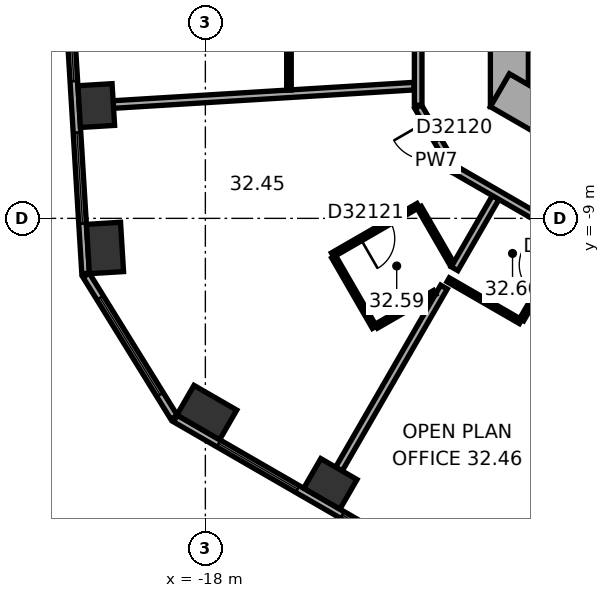
"""IFC4 building model, lengths in metres.
Left out: names, types, materials, properties, quantities, classifications, styles, units other than length and angle.
Written with IfcOpenShell. Run it as: python <this file> out.ifc"""

import sys

from ifc_helpers import new_model, si_unit, direction, frame, frame_2d, origin, origin_2d, place, context, subcontext, project, spatial, rectangle, extrude, element, fill, save


model = new_model("IFC4")
c1 = context("Model", 3, precision=1e-05, world=origin(), true_north=direction((0.0, 1.0)))
c2 = subcontext(c1, "Body", "Model", "MODEL_VIEW")
j1 = project(units=[si_unit("LENGTHUNIT", "METRE"), si_unit("PLANEANGLEUNIT", "RADIAN")], contexts=[c1])
p1 = place(None, origin())
s1 = spatial("IfcSite", under=j1, at=p1, CompositionType="ELEMENT")
p2 = place(p1, origin())
s2 = spatial("IfcBuilding", under=s1, at=p2, CompositionType="ELEMENT")
p3 = place(p2, frame((0.0, 0.0, 131.8)))
s3 = spatial("IfcBuildingStorey", under=s2, at=p3, CompositionType="ELEMENT", Elevation=131.8)
p4 = place(p3, frame((-20.871, -6.032, 0.0), z_axis=(0.0, 0.0, 1.0), x_axis=(0.061048539535, -0.998134798422, 0.0)))
e1 = element("IfcColumn", 1, at=p4, inside=s3, PredefinedType="COLUMN", context=c2, shape_type="SweptSolid", body=[
    extrude(rectangle(XDim=1.1, YDim=0.9, at=origin_2d()), origin(), (0.0, 0.0, 1.0), 3.7),
])
for number, where, z_axis, x_axis in (
    (2, (-20.642, -9.779, 0.0), (0.0, 0.0, 1.0), (0.061, -0.998, 0.0)),
    (3, (-17.962, -14.109, 0.0), (0.0, 0.0, 1.0), (0.866, -0.5, 0.0)),
):
    element("IfcColumn", number, at=place(p3, frame(where, z_axis=z_axis, x_axis=x_axis)), inside=s3, PredefinedType="COLUMN", context=c2, shape_type="SweptSolid", body=[
        extrude(rectangle(XDim=1.3, YDim=0.9, at=origin_2d()), origin(), (0.0, 0.0, 1.0), 3.7),
    ])
p5 = place(p3, frame((-14.711, -15.986, 0.0), z_axis=(0.0, 0.0, 1.0), x_axis=(0.866025403784, -0.5, 0.0)))
e4 = element("IfcColumn", 4, at=p5, inside=s3, PredefinedType="COLUMN", context=c2, shape_type="SweptSolid", body=[
    extrude(rectangle(XDim=1.1, YDim=0.9, at=origin_2d()), origin(), (0.0, 0.0, 1.0), 3.7),
])
p6 = place(p3, frame((-10.0, 6.062, 0.0), z_axis=(0.0, 0.0, 1.0), x_axis=(0.0, -1.0, 0.0)))
e5 = element("IfcWall", 5, at=p6, inside=s3, PredefinedType="SHEAR", context=c2, shape_type="SweptSolid", body=[
    extrude(rectangle(XDim=12.125, YDim=1.0, at=frame_2d((6.062, 0.0))), origin(), (0.0, 0.0, 1.0), 3.7),
])
p7 = place(p6, frame((6.612, 0.0, 0.0)))
e6 = element("IfcOpeningElement", 6, at=p7, cuts=e5, PredefinedType="OPENING", context=c2, shape_type="SweptSolid", body=[
    extrude(rectangle(XDim=0.9, YDim=2.1, at=frame_2d((0.45, 1.05))), frame((0.0, 0.51, 0.0), z_axis=(0.0, -1.0, 0.0), x_axis=(1.0, 0.0, 0.0)), (0.0, 0.0, 1.0), 1.02),
])
p8 = place(p3, frame((-10.25, -5.629, 0.0), z_axis=(0.0, 0.0, 1.0), x_axis=(0.866022616891, -0.50000482701, 0.0)))
e7 = element("IfcWall", 7, at=p8, inside=s3, PredefinedType="SHEAR", context=c2, shape_type="SweptSolid", body=[
    extrude(rectangle(XDim=12.125, YDim=1.0, at=frame_2d((6.062, 0.0))), origin(), (0.0, 0.0, 1.0), 3.7),
])
p9 = place(p8, frame((6.262, 0.0, 0.0)))
e8 = element("IfcOpeningElement", 8, at=p9, cuts=e7, PredefinedType="OPENING", context=c2, shape_type="SweptSolid", body=[
    extrude(rectangle(XDim=1.5, YDim=2.1, at=frame_2d((0.75, 1.05))), frame((0.0, 0.51, 0.0), z_axis=(0.0, -1.0, 0.0), x_axis=(1.0, 0.0, 0.0)), (0.0, 0.0, 1.0), 1.02),
])
p10 = place(p8, frame((1.812, 0.0, 0.0)))
e9 = element("IfcOpeningElement", 9, at=p10, cuts=e7, PredefinedType="OPENING", context=c2, shape_type="SweptSolid", body=[
    extrude(rectangle(XDim=0.9, YDim=2.1, at=frame_2d((0.45, 1.05))), frame((0.0, 0.51, 0.0), z_axis=(0.0, -1.0, 0.0), x_axis=(1.0, 0.0, 0.0)), (0.0, 0.0, 1.0), 1.02),
])
p11 = place(p8, frame((4.412, 0.0, 0.0)))
e10 = element("IfcOpeningElement", 10, at=p11, cuts=e7, PredefinedType="OPENING", context=c2, shape_type="SweptSolid", body=[
    extrude(rectangle(XDim=0.9, YDim=2.1, at=frame_2d((0.45, 1.05))), frame((0.0, 0.51, 0.0), z_axis=(0.0, -1.0, 0.0), x_axis=(1.0, 0.0, 0.0)), (0.0, 0.0, 1.0), 1.02),
])
p12 = place(p3, frame((-22.375, 9.557, 0.0), z_axis=(0.0, 0.0, 1.0), x_axis=(0.061036015339, -0.998135564356, 0.0)))
e11 = element("IfcWall", 11, at=p12, inside=s3, PredefinedType="STANDARD", context=c2, shape_type="SweptSolid", body=[
    extrude(rectangle(XDim=20.044, YDim=0.2, at=frame_2d((10.022, 0.0))), origin(), (0.0, 0.0, 1.0), 3.7),
])
p13 = place(p12, frame((1.313, 0.0, 0.9)))
e12 = element("IfcOpeningElement", 12, at=p13, cuts=e11, PredefinedType="OPENING", context=c2, shape_type="SweptSolid", body=[
    extrude(rectangle(XDim=2.4, YDim=2.0, at=frame_2d((1.2, 1.0))), frame((0.0, 0.11, 0.0), z_axis=(0.0, -1.0, 0.0), x_axis=(1.0, 0.0, 0.0)), (0.0, 0.0, 1.0), 0.22),
])
p14 = place(p12, frame((5.067, 0.0, 0.9)))
e13 = element("IfcOpeningElement", 13, at=p14, cuts=e11, PredefinedType="OPENING", context=c2, shape_type="SweptSolid", body=[
    extrude(rectangle(XDim=2.4, YDim=2.0, at=frame_2d((1.2, 1.0))), frame((0.0, 0.11, 0.0), z_axis=(0.0, -1.0, 0.0), x_axis=(1.0, 0.0, 0.0)), (0.0, 0.0, 1.0), 0.22),
])
p15 = place(p12, frame((8.821, 0.0, 0.9)))
e14 = element("IfcOpeningElement", 14, at=p15, cuts=e11, PredefinedType="OPENING", context=c2, shape_type="SweptSolid", body=[
    extrude(rectangle(XDim=2.4, YDim=2.0, at=frame_2d((1.2, 1.0))), frame((0.0, 0.11, 0.0), z_axis=(0.0, -1.0, 0.0), x_axis=(1.0, 0.0, 0.0)), (0.0, 0.0, 1.0), 0.22),
])
p16 = place(p12, frame((12.575, 0.0, 0.9)))
e15 = element("IfcOpeningElement", 15, at=p16, cuts=e11, PredefinedType="OPENING", context=c2, shape_type="SweptSolid", body=[
    extrude(rectangle(XDim=2.4, YDim=2.0, at=frame_2d((1.2, 1.0))), frame((0.0, 0.11, 0.0), z_axis=(0.0, -1.0, 0.0), x_axis=(1.0, 0.0, 0.0)), (0.0, 0.0, 1.0), 0.22),
])
p17 = place(p12, frame((16.329, 0.0, 0.9)))
e16 = element("IfcOpeningElement", 16, at=p17, cuts=e11, PredefinedType="OPENING", context=c2, shape_type="SweptSolid", body=[
    extrude(rectangle(XDim=2.4, YDim=2.0, at=frame_2d((1.2, 1.0))), frame((0.0, 0.11, 0.0), z_axis=(0.0, -1.0, 0.0), x_axis=(1.0, 0.0, 0.0)), (0.0, 0.0, 1.0), 0.22),
])
p18 = place(p3, frame((-21.137, -10.496, 0.0), z_axis=(0.0, 0.0, 1.0), x_axis=(0.526178661629, -0.850374044786, 0.0)))
e17 = element("IfcWall", 17, at=p18, inside=s3, PredefinedType="STANDARD", context=c2, shape_type="SweptSolid", body=[
    extrude(rectangle(XDim=4.395, YDim=0.2, at=frame_2d((2.197, 0.0))), origin(), (0.0, 0.0, 1.0), 3.7),
])
p19 = place(p18, frame((0.698, 0.0, 0.9)))
e18 = element("IfcOpeningElement", 18, at=p19, cuts=e17, PredefinedType="OPENING", context=c2, shape_type="SweptSolid", body=[
    extrude(rectangle(XDim=3.0, YDim=2.0, at=frame_2d((1.5, 1.0))), frame((0.0, 0.11, 0.0), z_axis=(0.0, -1.0, 0.0), x_axis=(1.0, 0.0, 0.0)), (0.0, 0.0, 1.0), 0.22),
])
p20 = place(p3, frame((-18.789, -14.267, 0.0), z_axis=(0.0, 0.0, 1.0), x_axis=(0.866023315909, -0.500003616288, 0.0)))
e19 = element("IfcWall", 19, at=p20, inside=s3, PredefinedType="STANDARD", context=c2, shape_type="SweptSolid", body=[
    extrude(rectangle(XDim=20.044, YDim=0.2, at=frame_2d((10.022, 0.0))), origin(), (0.0, 0.0, 1.0), 3.7),
])
p21 = place(p20, frame((1.314, 0.0, 0.9)))
e20 = element("IfcOpeningElement", 20, at=p21, cuts=e19, PredefinedType="OPENING", context=c2, shape_type="SweptSolid", body=[
    extrude(rectangle(XDim=2.4, YDim=2.0, at=frame_2d((1.2, 1.0))), frame((0.0, 0.11, 0.0), z_axis=(0.0, -1.0, 0.0), x_axis=(1.0, 0.0, 0.0)), (0.0, 0.0, 1.0), 0.22),
])
p22 = place(p20, frame((5.069, 0.0, 0.9)))
e21 = element("IfcOpeningElement", 21, at=p22, cuts=e19, PredefinedType="OPENING", context=c2, shape_type="SweptSolid", body=[
    extrude(rectangle(XDim=2.4, YDim=2.0, at=frame_2d((1.2, 1.0))), frame((0.0, 0.11, 0.0), z_axis=(0.0, -1.0, 0.0), x_axis=(1.0, 0.0, 0.0)), (0.0, 0.0, 1.0), 0.22),
])
p23 = place(p20, frame((8.823, 0.0, 0.9)))
e22 = element("IfcOpeningElement", 22, at=p23, cuts=e19, PredefinedType="OPENING", context=c2, shape_type="SweptSolid", body=[
    extrude(rectangle(XDim=2.4, YDim=2.0, at=frame_2d((1.2, 1.0))), frame((0.0, 0.11, 0.0), z_axis=(0.0, -1.0, 0.0), x_axis=(1.0, 0.0, 0.0)), (0.0, 0.0, 1.0), 0.22),
])
p24 = place(p20, frame((12.577, 0.0, 0.9)))
e23 = element("IfcOpeningElement", 23, at=p24, cuts=e19, PredefinedType="OPENING", context=c2, shape_type="SweptSolid", body=[
    extrude(rectangle(XDim=2.4, YDim=2.0, at=frame_2d((1.2, 1.0))), frame((0.0, 0.11, 0.0), z_axis=(0.0, -1.0, 0.0), x_axis=(1.0, 0.0, 0.0)), (0.0, 0.0, 1.0), 0.22),
])
p25 = place(p20, frame((16.331, 0.0, 0.9)))
e24 = element("IfcOpeningElement", 24, at=p25, cuts=e19, PredefinedType="OPENING", context=c2, shape_type="SweptSolid", body=[
    extrude(rectangle(XDim=2.4, YDim=2.0, at=frame_2d((1.2, 1.0))), frame((0.0, 0.11, 0.0), z_axis=(0.0, -1.0, 0.0), x_axis=(1.0, 0.0, 0.0)), (0.0, 0.0, 1.0), 0.22),
])
p26 = place(p3, frame((-20.421, -6.005, 0.0), z_axis=(0.0, 0.0, 1.0), x_axis=(0.998134865741, 0.061047438866, 0.0)))
e25 = element("IfcWall", 25, at=p26, inside=s3, PredefinedType="PARTITIONING", context=c2, shape_type="SweptSolid", body=[
    extrude(rectangle(XDim=7.927, YDim=0.2, at=frame_2d((3.963, 0.0))), origin(), (0.0, 0.0, 1.0), 2.87),
])
p27 = place(p3, frame((-15.8, -5.622, 0.0), z_axis=(0.0, 0.0, 1.0), x_axis=(0.0, 1.0, 0.0)))
e26 = element("IfcWall", 26, at=p27, inside=s3, PredefinedType="PARTITIONING", context=c2, shape_type="SweptSolid", body=[
    extrude(rectangle(XDim=3.308, YDim=0.12, at=frame_2d((1.654, 0.0))), origin(), (0.0, 0.0, 1.0), 3.42),
])
p28 = place(p3, frame((-14.653, -9.961, 0.0), z_axis=(0.0, 0.0, 1.0), x_axis=(0.866021400173, 0.500006934395, 0.0)))
e27 = element("IfcWall", 27, at=p28, inside=s3, PredefinedType="PARTITIONING", context=c2, shape_type="SweptSolid", body=[
    extrude(rectangle(XDim=2.6, YDim=0.12, at=frame_2d((1.3, 0.0))), origin(), (0.0, 0.0, 1.0), 3.42),
])
p29 = place(p28, frame((0.85, 0.0, 0.0)))
e28 = element("IfcOpeningElement", 28, at=p29, cuts=e27, PredefinedType="OPENING", context=c2, shape_type="SweptSolid", body=[
    extrude(rectangle(XDim=0.9, YDim=2.1, at=frame_2d((0.45, 1.05))), frame((0.0, 0.07, 0.0), z_axis=(0.0, -1.0, 0.0), x_axis=(1.0, 0.0, 0.0)), (0.0, 0.0, 1.0), 0.14),
])
p30 = place(p3, frame((-14.486, -15.597, 0.0), z_axis=(0.0, 0.0, 1.0), x_axis=(0.500003965547, 0.866023114263, 0.0)))
e29 = element("IfcWall", 29, at=p30, inside=s3, PredefinedType="PARTITIONING", context=c2, shape_type="SweptSolid", body=[
    extrude(rectangle(XDim=5.53, YDim=0.2, at=frame_2d((2.765, 0.0))), origin(), (0.0, 0.0, 1.0), 3.42),
])
p31 = place(p3, frame((-13.552, -11.866, 0.0), z_axis=(0.0, 0.0, 1.0), x_axis=(-0.500028586798, 0.86600889856, 0.0)))
e30 = element("IfcWall", 30, at=p31, inside=s3, PredefinedType="PARTITIONING", context=c2, shape_type="SweptSolid", body=[
    extrude(rectangle(XDim=2.14, YDim=0.12, at=frame_2d((1.07, 0.0))), origin(), (0.0, 0.0, 1.0), 3.42),
])
p32 = place(p3, frame((-12.4, -6.062, 0.0), z_axis=(0.0, 0.0, 1.0), x_axis=(0.500022797313, -0.86601224135, 0.0)))
e31 = element("IfcWall", 31, at=p32, inside=s3, PredefinedType="PARTITIONING", context=c2, shape_type="SweptSolid", body=[
    extrude(rectangle(XDim=1.9, YDim=0.2, at=frame_2d((0.95, 0.0))), origin(), (0.0, 0.0, 1.0), 3.42),
])
p33 = place(p32, frame((0.45, 0.0, 0.0)))
e32 = element("IfcOpeningElement", 32, at=p33, cuts=e31, PredefinedType="OPENING", context=c2, shape_type="SweptSolid", body=[
    extrude(rectangle(XDim=1.0, YDim=2.1, at=frame_2d((0.5, 1.05))), frame((0.0, 0.11, 0.0), z_axis=(0.0, -1.0, 0.0), x_axis=(1.0, 0.0, 0.0)), (0.0, 0.0, 1.0), 0.22),
])
p34 = place(p3, frame((-12.4, 5.769, 0.0), z_axis=(0.0, 0.0, 1.0), x_axis=(0.0, -1.0, 0.0)))
e33 = element("IfcWall", 33, at=p34, inside=s3, PredefinedType="PARTITIONING", context=c2, shape_type="SweptSolid", body=[
    extrude(rectangle(XDim=11.792, YDim=0.2, at=frame_2d((5.896, 0.0))), origin(), (0.0, 0.0, 1.0), 3.42),
])
p35 = place(p34, frame((1.381, 0.0, 0.0)))
e34 = element("IfcOpeningElement", 34, at=p35, cuts=e33, PredefinedType="OPENING", context=c2, shape_type="SweptSolid", body=[
    extrude(rectangle(XDim=1.0, YDim=2.1, at=frame_2d((0.5, 1.05))), frame((0.0, 0.11, 0.0), z_axis=(0.0, -1.0, 0.0), x_axis=(1.0, 0.0, 0.0)), (0.0, 0.0, 1.0), 0.22),
])
p36 = place(p34, frame((5.397, 0.0, 0.0)))
e35 = element("IfcOpeningElement", 35, at=p36, cuts=e33, PredefinedType="OPENING", context=c2, shape_type="SweptSolid", body=[
    extrude(rectangle(XDim=1.0, YDim=2.1, at=frame_2d((0.5, 1.05))), frame((0.0, 0.11, 0.0), z_axis=(0.0, -1.0, 0.0), x_axis=(1.0, 0.0, 0.0)), (0.0, 0.0, 1.0), 0.22),
])
p37 = place(p3, frame((-12.371, -8.713, 0.0), z_axis=(0.0, 0.0, 1.0), x_axis=(0.499910907645, -0.86607683517, 0.0)))
e36 = element("IfcWall", 36, at=p37, inside=s3, PredefinedType="PARTITIONING", context=c2, shape_type="SweptSolid", body=[
    extrude(rectangle(XDim=1.719, YDim=0.12, at=frame_2d((0.86, 0.0))), origin(), (0.0, 0.0, 1.0), 3.42),
])
p38 = place(p3, frame((-11.964, -10.949, 0.0), z_axis=(0.0, 0.0, 1.0), x_axis=(-0.86600680221, -0.500032217487, 0.0)))
e37 = element("IfcWall", 37, at=p38, inside=s3, PredefinedType="PARTITIONING", context=c2, shape_type="SweptSolid", body=[
    extrude(rectangle(XDim=1.774, YDim=0.12, at=frame_2d((0.887, 0.0))), origin(), (0.0, 0.0, 1.0), 3.42),
])
p39 = place(p3, frame((-11.442, -10.325, 0.0), z_axis=(0.0, 0.0, 1.0), x_axis=(0.500012369163, 0.866018262327, 0.0)))
e38 = element("IfcWall", 38, at=p39, inside=s3, PredefinedType="PARTITIONING", context=c2, shape_type="SweptSolid", body=[
    extrude(rectangle(XDim=2.163, YDim=0.2, at=frame_2d((1.081, 0.0))), origin(), (0.0, 0.0, 1.0), 3.42),
])
p40 = place(p3, frame((-11.415, -7.728, 0.0), z_axis=(0.0, 0.0, 1.0), x_axis=(0.866022749921, -0.500004596598, 0.0)))
e39 = element("IfcWall", 39, at=p40, inside=s3, PredefinedType="PARTITIONING", context=c2, shape_type="SweptSolid", body=[
    extrude(rectangle(XDim=12.084, YDim=0.2, at=frame_2d((6.042, 0.0))), origin(), (0.0, 0.0, 1.0), 3.42),
])
p41 = place(p40, frame((5.58, 0.0, 0.0)))
e40 = element("IfcOpeningElement", 40, at=p41, cuts=e39, PredefinedType="OPENING", context=c2, shape_type="SweptSolid", body=[
    extrude(rectangle(XDim=1.0, YDim=2.1, at=frame_2d((0.5, 1.05))), frame((0.0, 0.11, 0.0), z_axis=(0.0, -1.0, 0.0), x_axis=(1.0, 0.0, 0.0)), (0.0, 0.0, 1.0), 0.22),
])
p42 = place(p3, frame((-9.706, -11.717, 0.0), z_axis=(0.0, 0.0, 1.0), x_axis=(-0.86598042715, 0.500077893725, 0.0)))
e41 = element("IfcWall", 41, at=p42, inside=s3, PredefinedType="PARTITIONING", context=c2, shape_type="SweptSolid", body=[
    extrude(rectangle(XDim=2.2, YDim=0.12, at=frame_2d((1.1, 0.0))), origin(), (0.0, 0.0, 1.0), 3.42),
])
p43 = place(p3, frame((-8.456, -9.552, 0.0), z_axis=(0.0, 0.0, 1.0), x_axis=(-0.500002508028, -0.866023955769, 0.0)))
e42 = element("IfcWall", 42, at=p43, inside=s3, PredefinedType="PARTITIONING", context=c2, shape_type="SweptSolid", body=[
    extrude(rectangle(XDim=2.44, YDim=0.12, at=frame_2d((1.22, 0.0))), origin(), (0.0, 0.0, 1.0), 3.42),
])
p44 = place(p43, frame((0.77, 0.0, 0.0)))
e43 = element("IfcOpeningElement", 43, at=p44, cuts=e42, PredefinedType="OPENING", context=c2, shape_type="SweptSolid", body=[
    extrude(rectangle(XDim=0.9, YDim=2.1, at=frame_2d((0.45, 1.05))), frame((0.0, 0.07, 0.0), z_axis=(0.0, -1.0, 0.0), x_axis=(1.0, 0.0, 0.0)), (0.0, 0.0, 1.0), 0.14),
])
p45 = place(p16, origin())
e44 = element("IfcWindow", 44, at=p45, inside=s3, PartitioningType="SINGLE_PANEL", PredefinedType="WINDOW", context=c2, shape_type="SweptSolid", body=[
    extrude(rectangle(XDim=2.4, YDim=2.0, at=frame_2d((1.2, 1.0))), frame((0.0, 0.03, 0.0), z_axis=(0.0, -1.0, 0.0), x_axis=(1.0, 0.0, 0.0)), (0.0, 0.0, 1.0), 0.06),
])
fill(e15, e44)
p46 = place(p17, origin())
e45 = element("IfcWindow", 45, at=p46, inside=s3, PartitioningType="SINGLE_PANEL", PredefinedType="WINDOW", context=c2, shape_type="SweptSolid", body=[
    extrude(rectangle(XDim=2.4, YDim=2.0, at=frame_2d((1.2, 1.0))), frame((0.0, 0.03, 0.0), z_axis=(0.0, -1.0, 0.0), x_axis=(1.0, 0.0, 0.0)), (0.0, 0.0, 1.0), 0.06),
])
fill(e16, e45)
p47 = place(p19, origin())
e46 = element("IfcWindow", 46, at=p47, inside=s3, PartitioningType="SINGLE_PANEL", PredefinedType="WINDOW", context=c2, shape_type="SweptSolid", body=[
    extrude(rectangle(XDim=3.0, YDim=2.0, at=frame_2d((1.5, 1.0))), frame((0.0, 0.03, 0.0), z_axis=(0.0, -1.0, 0.0), x_axis=(1.0, 0.0, 0.0)), (0.0, 0.0, 1.0), 0.06),
])
fill(e18, e46)
p48 = place(p21, origin())
e47 = element("IfcWindow", 47, at=p48, inside=s3, PartitioningType="SINGLE_PANEL", PredefinedType="WINDOW", context=c2, shape_type="SweptSolid", body=[
    extrude(rectangle(XDim=2.4, YDim=2.0, at=frame_2d((1.2, 1.0))), frame((0.0, 0.03, 0.0), z_axis=(0.0, -1.0, 0.0), x_axis=(1.0, 0.0, 0.0)), (0.0, 0.0, 1.0), 0.06),
])
fill(e20, e47)
p49 = place(p22, origin())
e48 = element("IfcWindow", 48, at=p49, inside=s3, PartitioningType="SINGLE_PANEL", PredefinedType="WINDOW", context=c2, shape_type="SweptSolid", body=[
    extrude(rectangle(XDim=2.4, YDim=2.0, at=frame_2d((1.2, 1.0))), frame((0.0, 0.03, 0.0), z_axis=(0.0, -1.0, 0.0), x_axis=(1.0, 0.0, 0.0)), (0.0, 0.0, 1.0), 0.06),
])
fill(e21, e48)
p50 = place(p33, origin())
e49 = element("IfcDoor", 49, at=p50, inside=s3, OperationType="SINGLE_SWING_LEFT", PredefinedType="DOOR", context=c2, shape_type="SweptSolid", body=[
    extrude(rectangle(XDim=1.0, YDim=2.1, at=frame_2d((0.5, 1.05))), frame((0.0, 0.025, 0.0), z_axis=(0.0, -1.0, 0.0), x_axis=(1.0, 0.0, 0.0)), (0.0, 0.0, 1.0), 0.05),
])
fill(e32, e49)
p51 = place(p29, origin())
e50 = element("IfcDoor", 50, at=p51, inside=s3, OperationType="SINGLE_SWING_LEFT", PredefinedType="DOOR", context=c2, shape_type="SweptSolid", body=[
    extrude(rectangle(XDim=0.9, YDim=2.1, at=frame_2d((0.45, 1.05))), frame((0.0, 0.025, 0.0), z_axis=(0.0, -1.0, 0.0), x_axis=(1.0, 0.0, 0.0)), (0.0, 0.0, 1.0), 0.05),
])
fill(e28, e50)
save(model, sys.argv[1])
